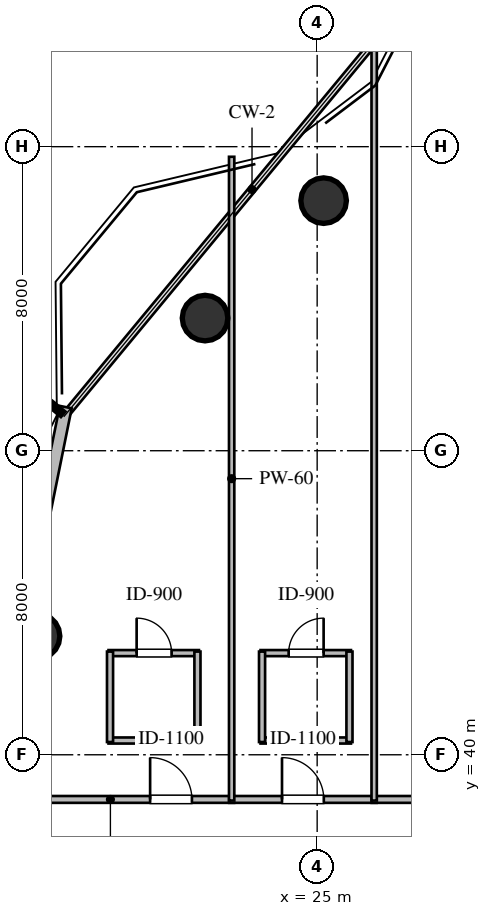
"""IFC4 building model, lengths in metres.
Left out: names, types, materials, properties, quantities, classifications, styles, units other than length and angle.
Written with IfcOpenShell. Run it as: python <this file> out.ifc"""

import sys

from ifc_helpers import new_model, si_unit, direction, frame, frame_2d, origin, origin_2d, place, context, subcontext, project, spatial, rectangle, circle, extrude, element, fill, save


model = new_model("IFC4")
c1 = context("Model", 3, precision=1e-05, world=origin(), true_north=direction((0.0, 1.0)))
c2 = subcontext(c1, "Body", "Model", "MODEL_VIEW")
j1 = project(units=[si_unit("LENGTHUNIT", "METRE"), si_unit("PLANEANGLEUNIT", "RADIAN")], contexts=[c1])
p1 = place(None, origin())
s1 = spatial("IfcSite", under=j1, at=p1, CompositionType="ELEMENT")
p2 = place(p1, origin())
s2 = spatial("IfcBuilding", under=s1, at=p2, CompositionType="ELEMENT")
p3 = place(p2, frame((0.0, 0.0, 138.6)))
s3 = spatial("IfcBuildingStorey", under=s2, at=p3, CompositionType="ELEMENT", Elevation=138.6)
for number, where, z_axis, x_axis in (
    (1, (25.17, 54.58, 0.0), (0.0, 0.0, 1.0), (1.0, 0.0, 0.0)),
    (2, (22.05, 51.49, 0.0), (0.0, 0.0, 1.0), (1.0, 0.0, 0.0)),
    (3, (17.63, 43.12, 0.0), (0.0, 0.0, 1.0), (1.0, 0.0, 0.0)),
):
    element("IfcColumn", number, at=place(p3, frame(where, z_axis=z_axis, x_axis=x_axis)), inside=s3, PredefinedType="COLUMN", context=c2, shape_type="SweptSolid", body=[
        extrude(circle(Radius=0.6, at=origin_2d()), origin(), (0.0, 0.0, 1.0), 3.6),
    ])
p4 = place(p3, frame((15.514, 34.967, 0.0), z_axis=(0.0, 0.0, 1.0), x_axis=(0.198370893133, 0.980127026848, 0.0)))
e4 = element("IfcWall", 4, at=p4, inside=s3, PredefinedType="STANDARD", context=c2, shape_type="SweptSolid", body=[
    extrude(rectangle(XDim=14.469, YDim=0.32, at=frame_2d((7.234, 0.0))), origin(), (0.0, 0.0, 1.0), 3.36),
])
p5 = place(p3, frame((19.51, 40.375, 0.0), z_axis=(0.0, 0.0, 1.0), x_axis=(1.0, 0.0, 0.0)))
e5 = element("IfcWall", 5, at=p5, inside=s3, PredefinedType="PLUMBINGWALL", context=c2, shape_type="SweptSolid", body=[
    extrude(rectangle(XDim=2.38, YDim=0.16, at=frame_2d((1.19, 0.0))), origin(), (0.0, 0.0, 1.0), 3.36),
])
p6 = place(p3, frame((19.51, 42.675, 0.0), z_axis=(0.0, 0.0, 1.0), x_axis=(1.0, 0.0, 0.0)))
e6 = element("IfcWall", 6, at=p6, inside=s3, PredefinedType="PLUMBINGWALL", context=c2, shape_type="SweptSolid", body=[
    extrude(rectangle(XDim=2.38, YDim=0.16, at=frame_2d((1.19, 0.0))), origin(), (0.0, 0.0, 1.0), 3.36),
])
p7 = place(p6, frame((0.74, 0.0, 0.0)))
e7 = element("IfcOpeningElement", 7, at=p7, cuts=e6, PredefinedType="OPENING", context=c2, shape_type="SweptSolid", body=[
    extrude(rectangle(XDim=0.92, YDim=2.1, at=frame_2d((0.46, 1.05))), frame((0.0, 0.09, 0.0), z_axis=(0.0, -1.0, 0.0), x_axis=(1.0, 0.0, 0.0)), (0.0, 0.0, 1.0), 0.18),
])
p8 = place(p3, frame((19.55, 40.335, 0.0), z_axis=(0.0, 0.0, 1.0), x_axis=(0.0, 1.0, 0.0)))
e8 = element("IfcWall", 8, at=p8, inside=s3, PredefinedType="PLUMBINGWALL", context=c2, shape_type="SweptSolid", body=[
    extrude(rectangle(XDim=2.38, YDim=0.16, at=frame_2d((1.19, 0.0))), origin(), (0.0, 0.0, 1.0), 3.36),
])
p9 = place(p3, frame((21.85, 40.335, 0.0), z_axis=(0.0, 0.0, 1.0), x_axis=(0.0, 1.0, 0.0)))
e9 = element("IfcWall", 9, at=p9, inside=s3, PredefinedType="PLUMBINGWALL", context=c2, shape_type="SweptSolid", body=[
    extrude(rectangle(XDim=2.38, YDim=0.16, at=frame_2d((1.19, 0.0))), origin(), (0.0, 0.0, 1.0), 2.806),
])
p10 = place(p3, frame((23.51, 40.375, 0.0), z_axis=(0.0, 0.0, 1.0), x_axis=(1.0, 0.0, 0.0)))
e10 = element("IfcWall", 10, at=p10, inside=s3, PredefinedType="PLUMBINGWALL", context=c2, shape_type="SweptSolid", body=[
    extrude(rectangle(XDim=2.38, YDim=0.16, at=frame_2d((1.19, 0.0))), origin(), (0.0, 0.0, 1.0), 3.36),
])
p11 = place(p3, frame((23.51, 42.675, 0.0), z_axis=(0.0, 0.0, 1.0), x_axis=(1.0, 0.0, 0.0)))
e11 = element("IfcWall", 11, at=p11, inside=s3, PredefinedType="PLUMBINGWALL", context=c2, shape_type="SweptSolid", body=[
    extrude(rectangle(XDim=2.38, YDim=0.16, at=frame_2d((1.19, 0.0))), origin(), (0.0, 0.0, 1.0), 3.36),
])
p12 = place(p11, frame((0.74, 0.0, 0.0)))
e12 = element("IfcOpeningElement", 12, at=p12, cuts=e11, PredefinedType="OPENING", context=c2, shape_type="SweptSolid", body=[
    extrude(rectangle(XDim=0.92, YDim=2.1, at=frame_2d((0.46, 1.05))), frame((0.0, 0.09, 0.0), z_axis=(0.0, -1.0, 0.0), x_axis=(1.0, 0.0, 0.0)), (0.0, 0.0, 1.0), 0.18),
])
p13 = place(p3, frame((23.55, 40.335, 0.0), z_axis=(0.0, 0.0, 1.0), x_axis=(0.0, 1.0, 0.0)))
e13 = element("IfcWall", 13, at=p13, inside=s3, PredefinedType="PLUMBINGWALL", context=c2, shape_type="SweptSolid", body=[
    extrude(rectangle(XDim=2.38, YDim=0.16, at=frame_2d((1.19, 0.0))), origin(), (0.0, 0.0, 1.0), 2.806),
])
p14 = place(p3, frame((25.85, 40.335, 0.0), z_axis=(0.0, 0.0, 1.0), x_axis=(0.0, 1.0, 0.0)))
e14 = element("IfcWall", 14, at=p14, inside=s3, PredefinedType="PLUMBINGWALL", context=c2, shape_type="SweptSolid", body=[
    extrude(rectangle(XDim=2.38, YDim=0.16, at=frame_2d((1.19, 0.0))), origin(), (0.0, 0.0, 1.0), 3.36),
])
p15 = place(p3, frame((16.305, 38.825, 0.0), z_axis=(0.0, 0.0, 1.0), x_axis=(1.0, 0.0, 0.0)))
e15 = element("IfcWall", 15, at=p15, inside=s3, PredefinedType="PARTITIONING", context=c2, shape_type="SweptSolid", body=[
    extrude(rectangle(XDim=6.51, YDim=0.18, at=frame_2d((3.255, 0.0))), origin(), (0.0, 0.0, 1.0), 3.36),
])
p16 = place(p15, frame((4.3, 0.0, 0.0)))
e16 = element("IfcOpeningElement", 16, at=p16, cuts=e15, PredefinedType="OPENING", context=c2, shape_type="SweptSolid", body=[
    extrude(rectangle(XDim=1.1, YDim=2.1, at=frame_2d((0.55, 1.05))), frame((0.0, 0.1, 0.0), z_axis=(0.0, -1.0, 0.0), x_axis=(1.0, 0.0, 0.0)), (0.0, 0.0, 1.0), 0.2),
])
p17 = place(p3, frame((22.685, 38.825, 0.0), z_axis=(0.0, 0.0, 1.0), x_axis=(1.0, 0.0, 0.0)))
e17 = element("IfcWall", 17, at=p17, inside=s3, PredefinedType="PARTITIONING", context=c2, shape_type="SweptSolid", body=[
    extrude(rectangle(XDim=3.88, YDim=0.18, at=frame_2d((1.94, 0.0))), origin(), (0.0, 0.0, 1.0), 3.36),
])
p18 = place(p17, frame((1.39, 0.0, 0.0)))
e18 = element("IfcOpeningElement", 18, at=p18, cuts=e17, PredefinedType="OPENING", context=c2, shape_type="SweptSolid", body=[
    extrude(rectangle(XDim=1.1, YDim=2.1, at=frame_2d((0.55, 1.05))), frame((0.0, 0.1, 0.0), z_axis=(0.0, -1.0, 0.0), x_axis=(1.0, 0.0, 0.0)), (0.0, 0.0, 1.0), 0.2),
])
p19 = place(p3, frame((26.435, 38.825, 0.0), z_axis=(0.0, 0.0, 1.0), x_axis=(1.0, 0.0, 0.0)))
e19 = element("IfcWall", 19, at=p19, inside=s3, PredefinedType="PARTITIONING", context=c2, shape_type="SweptSolid", body=[
    extrude(rectangle(XDim=4.13, YDim=0.18, at=frame_2d((2.065, 0.0))), origin(), (0.0, 0.0, 1.0), 3.36),
])
p20 = place(p19, frame((1.515, 0.0, 0.0)))
e20 = element("IfcOpeningElement", 20, at=p20, cuts=e19, PredefinedType="OPENING", context=c2, shape_type="SweptSolid", body=[
    extrude(rectangle(XDim=1.1, YDim=2.1, at=frame_2d((0.55, 1.05))), frame((0.0, 0.1, 0.0), z_axis=(0.0, -1.0, 0.0), x_axis=(1.0, 0.0, 0.0)), (0.0, 0.0, 1.0), 0.2),
])
p21 = place(p3, frame((22.75, 55.734, 0.0), z_axis=(0.0, 0.0, 1.0), x_axis=(0.0, -1.0, 0.0)))
e21 = element("IfcWall", 21, at=p21, inside=s3, PredefinedType="PARTITIONING", context=c2, shape_type="SweptSolid", body=[
    extrude(rectangle(XDim=16.939, YDim=0.14, at=frame_2d((8.469, 0.0))), origin(), (0.0, 0.0, 1.0), 2.806),
])
p22 = place(p3, frame((26.5, 58.742, 0.0), z_axis=(0.0, 0.0, 1.0), x_axis=(0.0, -1.0, 0.0)))
e22 = element("IfcWall", 22, at=p22, inside=s3, PredefinedType="PARTITIONING", context=c2, shape_type="SweptSolid", body=[
    extrude(rectangle(XDim=19.947, YDim=0.14, at=frame_2d((9.973, 0.0))), origin(), (0.0, 0.0, 1.0), 3.36),
])
p23 = place(p7, origin())
e23 = element("IfcDoor", 23, at=p23, inside=s3, OperationType="SINGLE_SWING_LEFT", PredefinedType="DOOR", context=c2, shape_type="SweptSolid", body=[
    extrude(rectangle(XDim=0.92, YDim=2.1, at=frame_2d((0.46, 1.05))), frame((0.0, 0.025, 0.0), z_axis=(0.0, -1.0, 0.0), x_axis=(1.0, 0.0, 0.0)), (0.0, 0.0, 1.0), 0.05),
])
fill(e7, e23)
p24 = place(p12, origin())
e24 = element("IfcDoor", 24, at=p24, inside=s3, OperationType="SINGLE_SWING_RIGHT", PredefinedType="DOOR", context=c2, shape_type="SweptSolid", body=[
    extrude(rectangle(XDim=0.92, YDim=2.1, at=frame_2d((0.46, 1.05))), frame((0.0, 0.025, 0.0), z_axis=(0.0, -1.0, 0.0), x_axis=(1.0, 0.0, 0.0)), (0.0, 0.0, 1.0), 0.05),
])
fill(e12, e24)
p25 = place(p16, origin())
e25 = element("IfcDoor", 25, at=p25, inside=s3, OperationType="SINGLE_SWING_LEFT", PredefinedType="DOOR", context=c2, shape_type="SweptSolid", body=[
    extrude(rectangle(XDim=1.1, YDim=2.1, at=frame_2d((0.55, 1.05))), frame((0.0, 0.025, 0.0), z_axis=(0.0, -1.0, 0.0), x_axis=(1.0, 0.0, 0.0)), (0.0, 0.0, 1.0), 0.05),
])
fill(e16, e25)
p26 = place(p18, origin())
e26 = element("IfcDoor", 26, at=p26, inside=s3, OperationType="SINGLE_SWING_LEFT", PredefinedType="DOOR", context=c2, shape_type="SweptSolid", body=[
    extrude(rectangle(XDim=1.1, YDim=2.1, at=frame_2d((0.55, 1.05))), frame((0.0, 0.025, 0.0), z_axis=(0.0, -1.0, 0.0), x_axis=(1.0, 0.0, 0.0)), (0.0, 0.0, 1.0), 0.05),
])
fill(e18, e26)
save(model, sys.argv[1])
